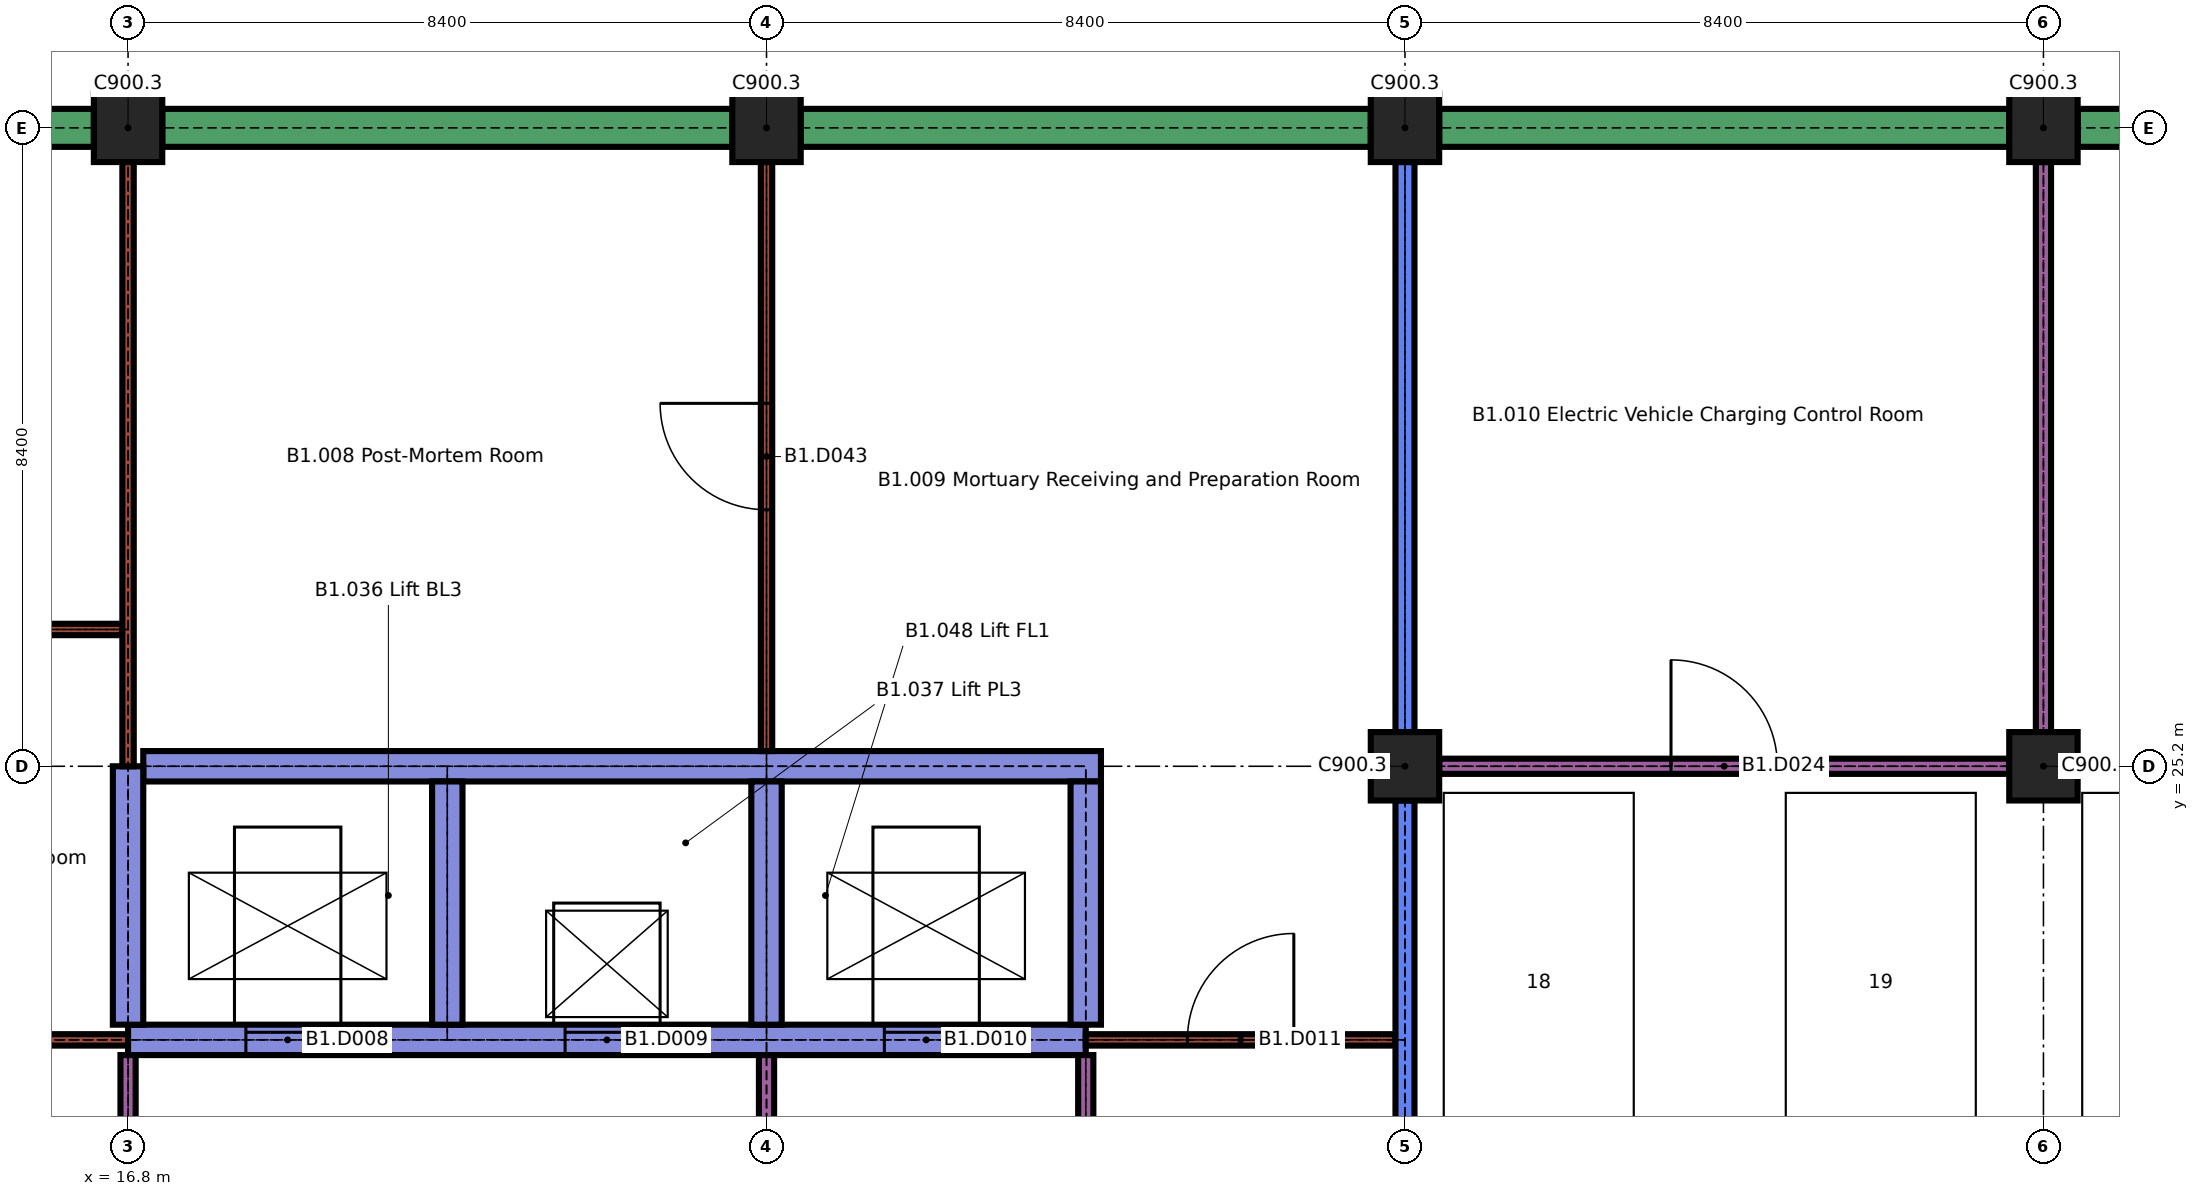
"""IFC4 building model, lengths in metres.
Left out: names, types, materials, properties, quantities, classifications, styles, units other than length and angle.
Written with IfcOpenShell. Run it as: python <this file> out.ifc"""

import sys

from ifc_helpers import new_model, si_unit, direction, frame, frame_2d, origin, origin_2d, place, context, subcontext, project, spatial, rectangle, extrude, element, fill, save


model = new_model("IFC4")
c1 = context("Model", 3, precision=1e-05, world=origin(), true_north=direction((0.0, 1.0)))
c2 = subcontext(c1, "Body", "Model", "MODEL_VIEW")
j1 = project(units=[si_unit("LENGTHUNIT", "METRE"), si_unit("PLANEANGLEUNIT", "RADIAN")], contexts=[c1])
p1 = place(None, origin())
s1 = spatial("IfcSite", under=j1, at=p1, CompositionType="ELEMENT")
p2 = place(p1, origin())
s2 = spatial("IfcBuilding", under=s1, at=p2, CompositionType="ELEMENT")
p3 = place(p2, frame((0.0, 0.0, -4.2)))
s3 = spatial("IfcBuildingStorey", under=s2, at=p3, CompositionType="ELEMENT", Elevation=-4.2)
for number, where, z_axis, x_axis in (
    (1, (33.6, 25.2, 0.0), (0.0, 0.0, 1.0), (1.0, 0.0, 0.0)),
    (2, (42.0, 25.2, 0.0), (0.0, 0.0, 1.0), (1.0, 0.0, 0.0)),
    (3, (16.8, 33.6, 0.0), (0.0, 0.0, 1.0), (1.0, 0.0, 0.0)),
    (4, (25.2, 33.6, 0.0), (0.0, 0.0, 1.0), (1.0, 0.0, 0.0)),
    (5, (33.6, 33.6, 0.0), (0.0, 0.0, 1.0), (1.0, 0.0, 0.0)),
    (6, (42.0, 33.6, 0.0), (0.0, 0.0, 1.0), (1.0, 0.0, 0.0)),
):
    element("IfcColumn", number, at=place(p3, frame(where, z_axis=z_axis, x_axis=x_axis)), inside=s3, PredefinedType="COLUMN", context=c2, shape_type="SweptSolid", body=[
        extrude(rectangle(XDim=0.9, YDim=0.9, at=origin_2d()), origin(), (0.0, 0.0, 1.0), 3.75),
    ])
p4 = place(p3, frame((0.25, 33.6, 0.0), z_axis=(0.0, 0.0, 1.0), x_axis=(1.0, 0.0, 0.0)))
e7 = element("IfcWall", 7, at=p4, inside=s3, PredefinedType="SOLIDWALL", context=c2, shape_type="SweptSolid", body=[
    extrude(rectangle(XDim=16.1, YDim=0.5, at=frame_2d((8.05, 0.0))), origin(), (0.0, 0.0, 1.0), 3.75),
])
for number, where, z_axis, x_axis in (
    (8, (17.25, 33.6, 0.0), (0.0, 0.0, 1.0), (1.0, 0.0, 0.0)),
    (9, (25.65, 33.6, 0.0), (0.0, 0.0, 1.0), (1.0, 0.0, 0.0)),
    (10, (34.05, 33.6, 0.0), (0.0, 0.0, 1.0), (1.0, 0.0, 0.0)),
):
    element("IfcWall", number, at=place(p3, frame(where, z_axis=z_axis, x_axis=x_axis)), inside=s3, PredefinedType="SOLIDWALL", context=c2, shape_type="SweptSolid", body=[
        extrude(rectangle(XDim=7.5, YDim=0.5, at=frame_2d((3.75, 0.0))), origin(), (0.0, 0.0, 1.0), 3.75),
    ])
p5 = place(p3, frame((42.45, 33.6, 0.0), z_axis=(0.0, 0.0, 1.0), x_axis=(1.0, 0.0, 0.0)))
e11 = element("IfcWall", 11, at=p5, inside=s3, PredefinedType="SOLIDWALL", context=c2, shape_type="SweptSolid", body=[
    extrude(rectangle(XDim=41.1, YDim=0.5, at=frame_2d((20.55, 0.0))), origin(), (0.0, 0.0, 1.0), 3.75),
])
p6 = place(p3, frame((8.325, 21.6, 0.0), z_axis=(0.0, 0.0, 1.0), x_axis=(1.0, 0.0, 0.0)))
e12 = element("IfcWall", 12, at=p6, inside=s3, PredefinedType="PARTITIONING", context=c2, shape_type="SweptSolid", body=[
    extrude(rectangle(XDim=8.475, YDim=0.15, at=frame_2d((4.238, 0.0))), origin(), (0.0, 0.0, 1.0), 3.75),
])
p7 = place(p3, frame((16.8, 21.6, 0.0), z_axis=(0.0, 0.0, 1.0), x_axis=(1.0, 0.0, 0.0)))
e13 = element("IfcWall", 13, at=p7, inside=s3, PredefinedType="SHEAR", context=c2, shape_type="SweptSolid", body=[
    extrude(rectangle(XDim=12.6, YDim=0.4, at=frame_2d((6.3, 0.0))), origin(), (0.0, 0.0, 1.0), 3.75),
])
p8 = place(p7, frame((1.55, 0.0, 0.0)))
e14 = element("IfcOpeningElement", 14, at=p8, cuts=e13, PredefinedType="OPENING", context=c2, shape_type="SweptSolid", body=[
    extrude(rectangle(XDim=1.1, YDim=2.1, at=frame_2d((0.55, 1.05))), frame((0.0, 0.21, 0.0), z_axis=(0.0, -1.0, 0.0), x_axis=(1.0, 0.0, 0.0)), (0.0, 0.0, 1.0), 0.42),
])
p9 = place(p7, frame((5.75, 0.0, 0.0)))
e15 = element("IfcOpeningElement", 15, at=p9, cuts=e13, PredefinedType="OPENING", context=c2, shape_type="SweptSolid", body=[
    extrude(rectangle(XDim=1.1, YDim=2.1, at=frame_2d((0.55, 1.05))), frame((0.0, 0.21, 0.0), z_axis=(0.0, -1.0, 0.0), x_axis=(1.0, 0.0, 0.0)), (0.0, 0.0, 1.0), 0.42),
])
p10 = place(p7, frame((9.95, 0.0, 0.0)))
e16 = element("IfcOpeningElement", 16, at=p10, cuts=e13, PredefinedType="OPENING", context=c2, shape_type="SweptSolid", body=[
    extrude(rectangle(XDim=1.1, YDim=2.1, at=frame_2d((0.55, 1.05))), frame((0.0, 0.21, 0.0), z_axis=(0.0, -1.0, 0.0), x_axis=(1.0, 0.0, 0.0)), (0.0, 0.0, 1.0), 0.42),
])
p11 = place(p3, frame((29.4, 21.6, 0.0), z_axis=(0.0, 0.0, 1.0), x_axis=(1.0, 0.0, 0.0)))
e17 = element("IfcWall", 17, at=p11, inside=s3, PredefinedType="PARTITIONING", context=c2, shape_type="SweptSolid", body=[
    extrude(rectangle(XDim=4.075, YDim=0.15, at=frame_2d((2.038, 0.0))), origin(), (0.0, 0.0, 1.0), 3.75),
])
p12 = place(p11, frame((1.337, 0.0, 0.0)))
e18 = element("IfcOpeningElement", 18, at=p12, cuts=e17, PredefinedType="OPENING", context=c2, shape_type="SweptSolid", body=[
    extrude(rectangle(XDim=1.4, YDim=2.1, at=frame_2d((0.7, 1.05))), frame((0.0, 0.085, 0.0), z_axis=(0.0, -1.0, 0.0), x_axis=(1.0, 0.0, 0.0)), (0.0, 0.0, 1.0), 0.17),
])
p13 = place(p3, frame((17.0, 25.2, 0.0), z_axis=(0.0, 0.0, 1.0), x_axis=(1.0, 0.0, 0.0)))
e19 = element("IfcWall", 19, at=p13, inside=s3, PredefinedType="SHEAR", context=c2, shape_type="SweptSolid", body=[
    extrude(rectangle(XDim=12.6, YDim=0.4, at=frame_2d((6.3, 0.0))), origin(), (0.0, 0.0, 1.0), 3.75),
])
p14 = place(p3, frame((34.05, 25.2, 0.0), z_axis=(0.0, 0.0, 1.0), x_axis=(1.0, 0.0, 0.0)))
e20 = element("IfcWall", 20, at=p14, inside=s3, PredefinedType="PARTITIONING", context=c2, shape_type="SweptSolid", body=[
    extrude(rectangle(XDim=7.5, YDim=0.2, at=frame_2d((3.75, 0.0))), origin(), (0.0, 0.0, 1.0), 3.75),
])
p15 = place(p14, frame((3.05, 0.0, 0.0)))
e21 = element("IfcOpeningElement", 21, at=p15, cuts=e20, PredefinedType="OPENING", context=c2, shape_type="SweptSolid", body=[
    extrude(rectangle(XDim=1.4, YDim=2.1, at=frame_2d((0.7, 1.05))), frame((0.0, 0.11, 0.0), z_axis=(0.0, -1.0, 0.0), x_axis=(1.0, 0.0, 0.0)), (0.0, 0.0, 1.0), 0.22),
])
p16 = place(p3, frame((8.5, 27.0, 0.0), z_axis=(0.0, 0.0, 1.0), x_axis=(1.0, 0.0, 0.0)))
e22 = element("IfcWall", 22, at=p16, inside=s3, PredefinedType="PARTITIONING", context=c2, shape_type="SweptSolid", body=[
    extrude(rectangle(XDim=8.225, YDim=0.15, at=frame_2d((4.113, 0.0))), origin(), (0.0, 0.0, 1.0), 3.75),
])
p17 = place(p16, frame((3.413, 0.0, 0.0)))
e23 = element("IfcOpeningElement", 23, at=p17, cuts=e22, PredefinedType="OPENING", context=c2, shape_type="SweptSolid", body=[
    extrude(rectangle(XDim=1.4, YDim=2.1, at=frame_2d((0.7, 1.05))), frame((0.0, 0.085, 0.0), z_axis=(0.0, -1.0, 0.0), x_axis=(1.0, 0.0, 0.0)), (0.0, 0.0, 1.0), 0.17),
])
p18 = place(p3, frame((16.8, 16.9, 0.0), z_axis=(0.0, 0.0, 1.0), x_axis=(0.0, 1.0, 0.0)))
e24 = element("IfcWall", 24, at=p18, inside=s3, PredefinedType="PARTITIONING", context=c2, shape_type="SweptSolid", body=[
    extrude(rectangle(XDim=4.5, YDim=0.2, at=frame_2d((2.25, 0.0))), origin(), (0.0, 0.0, 1.0), 3.75),
])
p19 = place(p18, frame((1.55, 0.0, 0.0)))
e25 = element("IfcOpeningElement", 25, at=p19, cuts=e24, PredefinedType="OPENING", context=c2, shape_type="SweptSolid", body=[
    extrude(rectangle(XDim=1.4, YDim=2.1, at=frame_2d((0.7, 1.05))), frame((0.0, 0.11, 0.0), z_axis=(0.0, -1.0, 0.0), x_axis=(1.0, 0.0, 0.0)), (0.0, 0.0, 1.0), 0.22),
])
p20 = place(p3, frame((16.8, 21.8, 0.0), z_axis=(0.0, 0.0, 1.0), x_axis=(0.0, 1.0, 0.0)))
e26 = element("IfcWall", 26, at=p20, inside=s3, PredefinedType="SHEAR", context=c2, shape_type="SweptSolid", body=[
    extrude(rectangle(XDim=3.4, YDim=0.4, at=frame_2d((1.7, 0.0))), origin(), (0.0, 0.0, 1.0), 3.75),
])
p21 = place(p3, frame((16.8, 25.2, 0.0), z_axis=(0.0, 0.0, 1.0), x_axis=(0.0, 1.0, 0.0)))
e27 = element("IfcWall", 27, at=p21, inside=s3, PredefinedType="PARTITIONING", context=c2, shape_type="SweptSolid", body=[
    extrude(rectangle(XDim=7.95, YDim=0.15, at=frame_2d((3.975, 0.0))), origin(), (0.0, 0.0, 1.0), 3.75),
])
p22 = place(p3, frame((21.0, 21.8, 0.0), z_axis=(0.0, 0.0, 1.0), x_axis=(0.0, 1.0, 0.0)))
e28 = element("IfcWall", 28, at=p22, inside=s3, PredefinedType="SHEAR", context=c2, shape_type="SweptSolid", body=[
    extrude(rectangle(XDim=3.2, YDim=0.4, at=frame_2d((1.6, 0.0))), origin(), (0.0, 0.0, 1.0), 3.75),
])
p23 = place(p3, frame((25.2, 16.9, 0.0), z_axis=(0.0, 0.0, 1.0), x_axis=(0.0, 1.0, 0.0)))
e29 = element("IfcWall", 29, at=p23, inside=s3, PredefinedType="PARTITIONING", context=c2, shape_type="SweptSolid", body=[
    extrude(rectangle(XDim=4.5, YDim=0.2, at=frame_2d((2.25, 0.0))), origin(), (0.0, 0.0, 1.0), 3.75),
])
p24 = place(p23, frame((1.55, 0.0, 0.0)))
e30 = element("IfcOpeningElement", 30, at=p24, cuts=e29, PredefinedType="OPENING", context=c2, shape_type="SweptSolid", body=[
    extrude(rectangle(XDim=1.4, YDim=2.1, at=frame_2d((0.7, 1.05))), frame((0.0, 0.11, 0.0), z_axis=(0.0, -1.0, 0.0), x_axis=(1.0, 0.0, 0.0)), (0.0, 0.0, 1.0), 0.22),
])
p25 = place(p3, frame((25.2, 21.8, 0.0), z_axis=(0.0, 0.0, 1.0), x_axis=(0.0, 1.0, 0.0)))
e31 = element("IfcWall", 31, at=p25, inside=s3, PredefinedType="SHEAR", context=c2, shape_type="SweptSolid", body=[
    extrude(rectangle(XDim=3.2, YDim=0.4, at=frame_2d((1.6, 0.0))), origin(), (0.0, 0.0, 1.0), 3.75),
])
p26 = place(p3, frame((25.2, 25.4, 0.0), z_axis=(0.0, 0.0, 1.0), x_axis=(0.0, 1.0, 0.0)))
e32 = element("IfcWall", 32, at=p26, inside=s3, PredefinedType="PARTITIONING", context=c2, shape_type="SweptSolid", body=[
    extrude(rectangle(XDim=7.75, YDim=0.15, at=frame_2d((3.875, 0.0))), origin(), (0.0, 0.0, 1.0), 3.75),
])
p27 = place(p26, frame((3.175, 0.0, 0.0)))
e33 = element("IfcOpeningElement", 33, at=p27, cuts=e32, PredefinedType="OPENING", context=c2, shape_type="SweptSolid", body=[
    extrude(rectangle(XDim=1.4, YDim=2.1, at=frame_2d((0.7, 1.05))), frame((0.0, 0.085, 0.0), z_axis=(0.0, -1.0, 0.0), x_axis=(1.0, 0.0, 0.0)), (0.0, 0.0, 1.0), 0.17),
])
p28 = place(p3, frame((29.4, 16.8, 0.0), z_axis=(0.0, 0.0, 1.0), x_axis=(0.0, 1.0, 0.0)))
e34 = element("IfcWall", 34, at=p28, inside=s3, PredefinedType="PARTITIONING", context=c2, shape_type="SweptSolid", body=[
    extrude(rectangle(XDim=4.6, YDim=0.2, at=frame_2d((2.3, 0.0))), origin(), (0.0, 0.0, 1.0), 3.75),
])
p29 = place(p28, frame((1.6, 0.0, 0.0)))
e35 = element("IfcOpeningElement", 35, at=p29, cuts=e34, PredefinedType="OPENING", context=c2, shape_type="SweptSolid", body=[
    extrude(rectangle(XDim=1.4, YDim=2.1, at=frame_2d((0.7, 1.05))), frame((0.0, 0.11, 0.0), z_axis=(0.0, -1.0, 0.0), x_axis=(1.0, 0.0, 0.0)), (0.0, 0.0, 1.0), 0.22),
])
p30 = place(p3, frame((29.4, 21.8, 0.0), z_axis=(0.0, 0.0, 1.0), x_axis=(0.0, 1.0, 0.0)))
e36 = element("IfcWall", 36, at=p30, inside=s3, PredefinedType="SHEAR", context=c2, shape_type="SweptSolid", body=[
    extrude(rectangle(XDim=3.2, YDim=0.4, at=frame_2d((1.6, 0.0))), origin(), (0.0, 0.0, 1.0), 3.75),
])
for number, where, z_axis, x_axis in (
    (37, (33.6, 17.25, 0.0), (0.0, 0.0, 1.0), (0.0, 1.0, 0.0)),
    (38, (33.6, 25.65, 0.0), (0.0, 0.0, 1.0), (0.0, 1.0, 0.0)),
):
    element("IfcWall", number, at=place(p3, frame(where, z_axis=z_axis, x_axis=x_axis)), inside=s3, PredefinedType="SOLIDWALL", context=c2, shape_type="SweptSolid", body=[
        extrude(rectangle(XDim=7.5, YDim=0.25, at=frame_2d((3.75, 0.0))), origin(), (0.0, 0.0, 1.0), 3.75),
    ])
p31 = place(p3, frame((42.0, 25.65, 0.0), z_axis=(0.0, 0.0, 1.0), x_axis=(0.0, 1.0, 0.0)))
e39 = element("IfcWall", 39, at=p31, inside=s3, PredefinedType="PARTITIONING", context=c2, shape_type="SweptSolid", body=[
    extrude(rectangle(XDim=7.5, YDim=0.2, at=frame_2d((3.75, 0.0))), origin(), (0.0, 0.0, 1.0), 3.75),
])
p32 = place(p8, origin())
e40 = element("IfcDoor", 40, at=p32, inside=s3, OperationType="SLIDING_TO_LEFT", PredefinedType="DOOR", context=c2, shape_type="SweptSolid", body=[
    extrude(rectangle(XDim=1.1, YDim=2.1, at=frame_2d((0.55, 1.05))), frame((0.0, 0.025, 0.0), z_axis=(0.0, -1.0, 0.0), x_axis=(1.0, 0.0, 0.0)), (0.0, 0.0, 1.0), 0.05),
])
fill(e14, e40)
p33 = place(p9, origin())
e41 = element("IfcDoor", 41, at=p33, inside=s3, OperationType="SLIDING_TO_LEFT", PredefinedType="DOOR", context=c2, shape_type="SweptSolid", body=[
    extrude(rectangle(XDim=1.1, YDim=2.1, at=frame_2d((0.55, 1.05))), frame((0.0, 0.025, 0.0), z_axis=(0.0, -1.0, 0.0), x_axis=(1.0, 0.0, 0.0)), (0.0, 0.0, 1.0), 0.05),
])
fill(e15, e41)
p34 = place(p10, origin())
e42 = element("IfcDoor", 42, at=p34, inside=s3, OperationType="SLIDING_TO_LEFT", PredefinedType="DOOR", context=c2, shape_type="SweptSolid", body=[
    extrude(rectangle(XDim=1.1, YDim=2.1, at=frame_2d((0.55, 1.05))), frame((0.0, 0.025, 0.0), z_axis=(0.0, -1.0, 0.0), x_axis=(1.0, 0.0, 0.0)), (0.0, 0.0, 1.0), 0.05),
])
fill(e16, e42)
p35 = place(p12, origin())
e43 = element("IfcDoor", 43, at=p35, inside=s3, OperationType="SINGLE_SWING_LEFT", PredefinedType="DOOR", context=c2, shape_type="SweptSolid", body=[
    extrude(rectangle(XDim=1.4, YDim=2.1, at=frame_2d((0.7, 1.05))), frame((0.0, 0.025, 0.0), z_axis=(0.0, -1.0, 0.0), x_axis=(1.0, 0.0, 0.0)), (0.0, 0.0, 1.0), 0.05),
])
fill(e18, e43)
p36 = place(p15, origin())
e44 = element("IfcDoor", 44, at=p36, inside=s3, OperationType="SINGLE_SWING_RIGHT", PredefinedType="DOOR", context=c2, shape_type="SweptSolid", body=[
    extrude(rectangle(XDim=1.4, YDim=2.1, at=frame_2d((0.7, 1.05))), frame((0.0, 0.025, 0.0), z_axis=(0.0, -1.0, 0.0), x_axis=(1.0, 0.0, 0.0)), (0.0, 0.0, 1.0), 0.05),
])
fill(e21, e44)
p37 = place(p27, origin())
e45 = element("IfcDoor", 45, at=p37, inside=s3, OperationType="SINGLE_SWING_LEFT", PredefinedType="DOOR", context=c2, shape_type="SweptSolid", body=[
    extrude(rectangle(XDim=1.4, YDim=2.1, at=frame_2d((0.7, 1.05))), frame((0.0, 0.025, 0.0), z_axis=(0.0, -1.0, 0.0), x_axis=(1.0, 0.0, 0.0)), (0.0, 0.0, 1.0), 0.05),
])
fill(e33, e45)
save(model, sys.argv[1])
